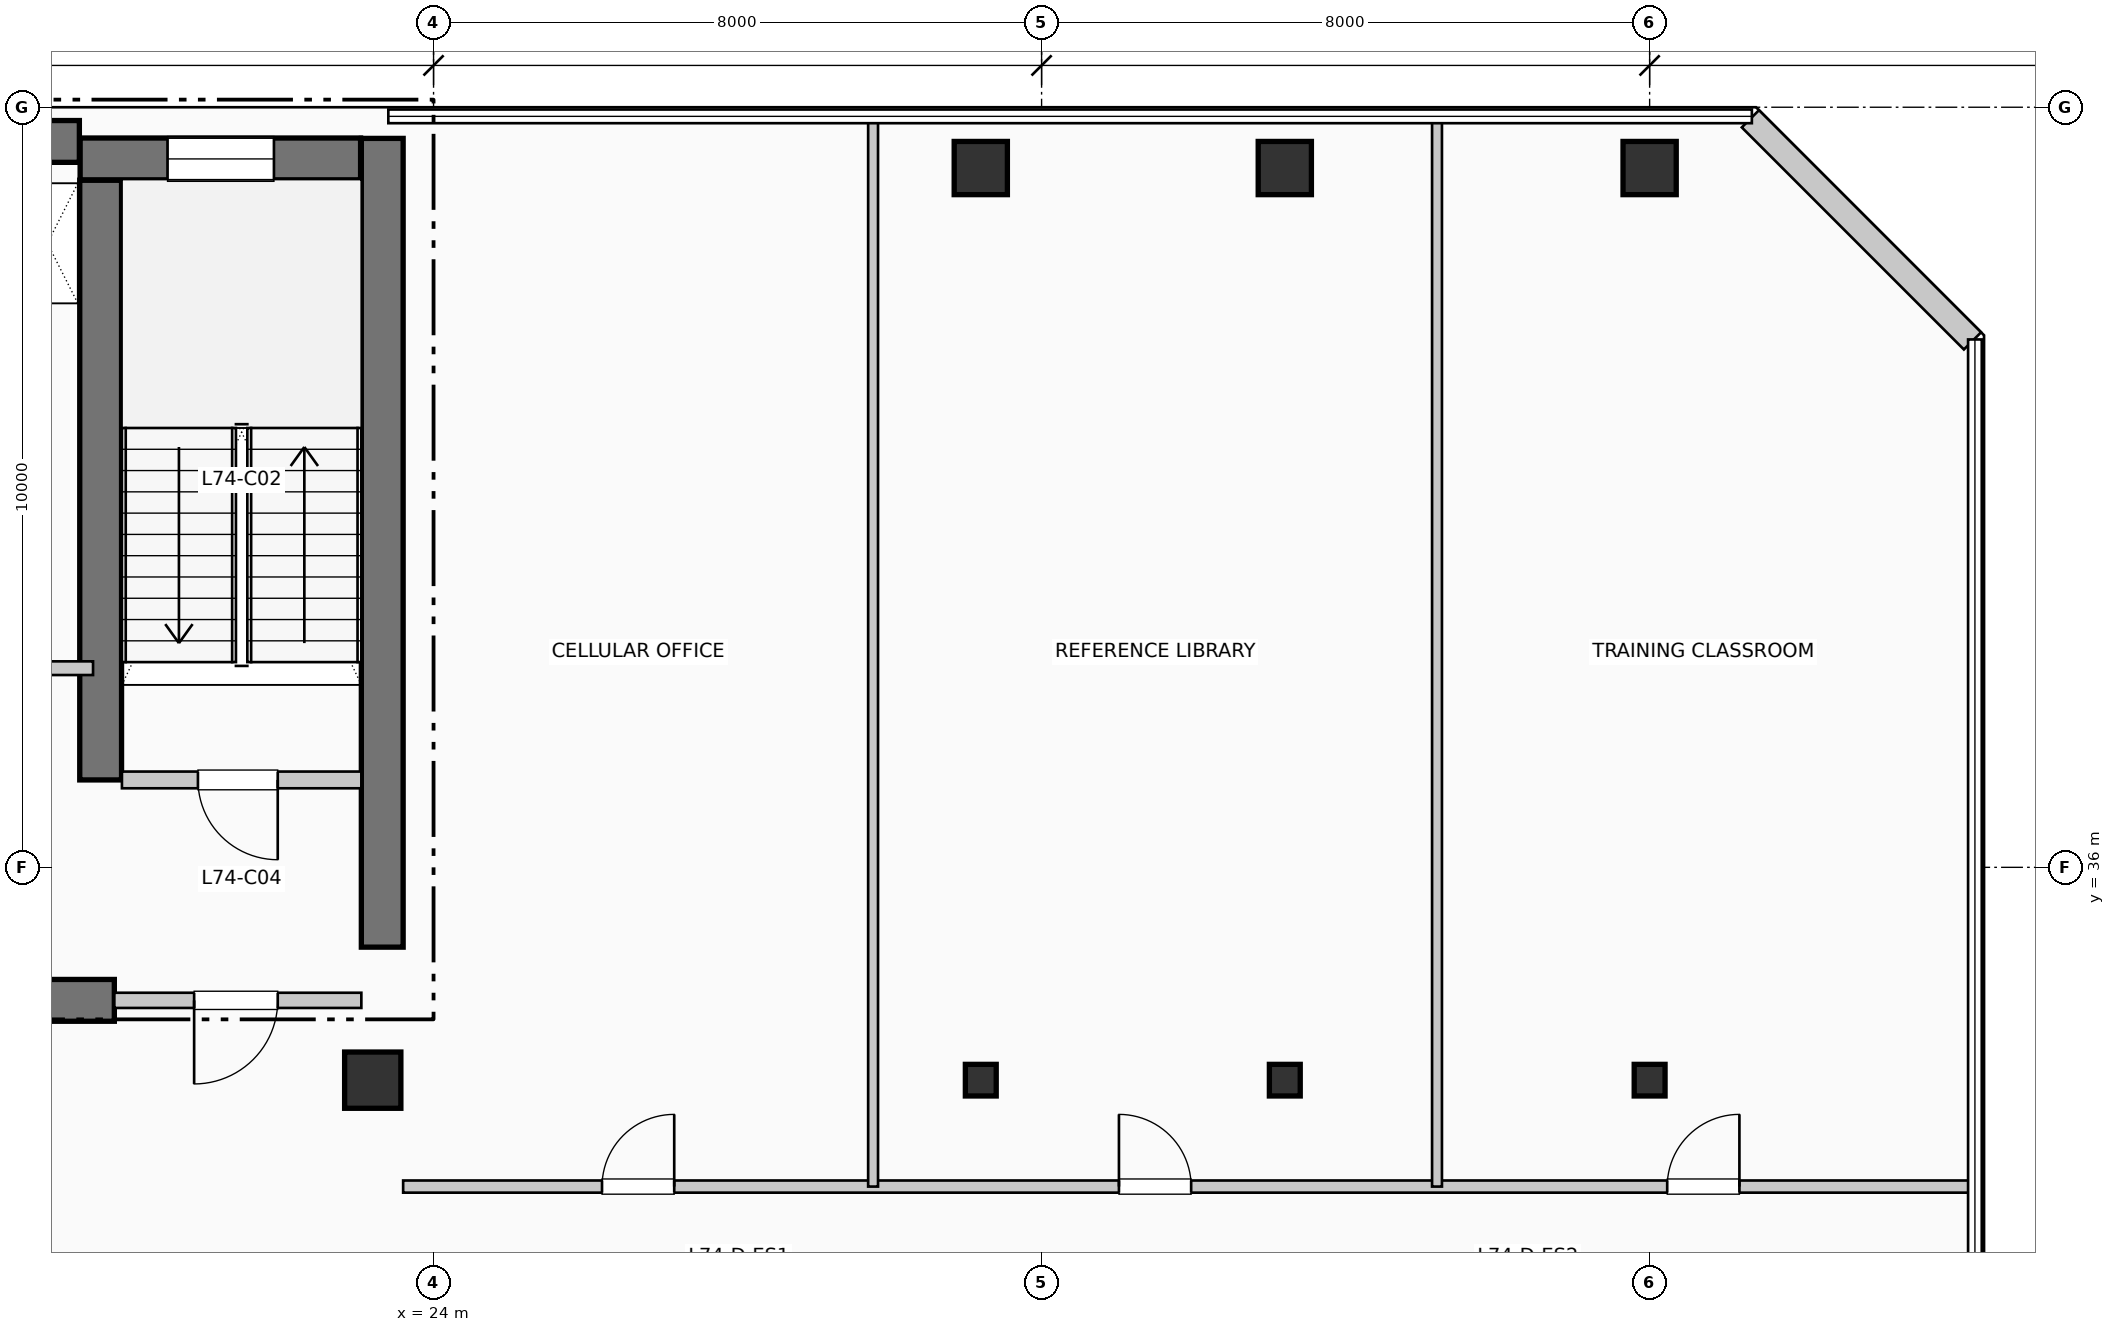
"""IFC4 building model, lengths in metres.
Left out: names, types, materials, properties, quantities, classifications, styles, units other than length and angle.
Written with IfcOpenShell. Run it as: python <this file> out.ifc"""

import sys

from ifc_helpers import new_model, si_unit, direction, frame, frame_2d, origin, origin_2d, place, context, subcontext, project, spatial, rectangle, i_section, extrude, element, fill, save


model = new_model("IFC4")
c1 = context("Model", 3, precision=1e-05, world=origin(), true_north=direction((0.0, 1.0)))
c2 = subcontext(c1, "Body", "Model", "MODEL_VIEW")
j1 = project(units=[si_unit("LENGTHUNIT", "METRE"), si_unit("PLANEANGLEUNIT", "RADIAN")], contexts=[c1])
p1 = place(None, origin())
s1 = spatial("IfcSite", under=j1, at=p1, CompositionType="ELEMENT")
p2 = place(p1, origin())
s2 = spatial("IfcBuilding", under=s1, at=p2, CompositionType="ELEMENT")
p3 = place(p2, frame((0.0, 0.0, 303.93)))
s3 = spatial("IfcBuildingStorey", under=s2, at=p3, CompositionType="ELEMENT", Elevation=303.93)
p4 = place(p3, frame((5.36, 45.55, 0.0), z_axis=(0.0, 0.0, 1.0), x_axis=(1.0, 0.0, 0.0)))
e1 = element("IfcWall", 1, at=p4, inside=s3, PredefinedType="SHEAR", context=c2, shape_type="SweptSolid", body=[
    extrude(rectangle(XDim=13.98, YDim=0.55, at=frame_2d((6.99, 0.0))), origin(), (0.0, 0.0, 1.0), 3.96),
])
p5 = place(p3, frame((23.325, 34.95, 0.0), z_axis=(0.0, 0.0, 1.0), x_axis=(0.0, 1.0, 0.0)))
e2 = element("IfcWall", 2, at=p5, inside=s3, PredefinedType="SHEAR", context=c2, shape_type="SweptSolid", body=[
    extrude(rectangle(XDim=10.64, YDim=0.55, at=frame_2d((5.32, 0.0))), origin(), (0.0, 0.0, 1.0), 3.96),
])
p6 = place(p3, frame((13.68, 34.25, 0.0), z_axis=(0.0, 0.0, 1.0), x_axis=(1.0, 0.0, 0.0)))
e3 = element("IfcWall", 3, at=p6, inside=s3, PredefinedType="SHEAR", context=c2, shape_type="SweptSolid", body=[
    extrude(rectangle(XDim=6.12, YDim=0.55, at=frame_2d((3.06, 0.0))), origin(), (0.0, 0.0, 1.0), 3.96),
])
p7 = place(p3, frame((19.62, 37.15, 0.0), z_axis=(0.0, 0.0, 1.0), x_axis=(0.0, 1.0, 0.0)))
e4 = element("IfcWall", 4, at=p7, inside=s3, PredefinedType="SHEAR", context=c2, shape_type="SweptSolid", body=[
    extrude(rectangle(XDim=7.89, YDim=0.55, at=frame_2d((3.945, 0.0))), origin(), (0.0, 0.0, 1.0), 3.96),
])
p8 = place(p3, frame((19.35, 45.32, 0.0), z_axis=(0.0, 0.0, 1.0), x_axis=(1.0, 0.0, 0.0)))
e5 = element("IfcWall", 5, at=p8, inside=s3, PredefinedType="SHEAR", context=c2, shape_type="SweptSolid", body=[
    extrude(rectangle(XDim=3.69, YDim=0.55, at=frame_2d((1.845, 0.0))), origin(), (0.0, 0.0, 1.0), 3.96),
])
p9 = place(p8, frame((1.15, 0.0, 1.05)))
e6 = element("IfcOpeningElement", 6, at=p9, cuts=e5, PredefinedType="OPENING", context=c2, shape_type="SweptSolid", body=[
    extrude(rectangle(XDim=1.4, YDim=1.8, at=frame_2d((0.7, 0.9))), frame((0.0, 0.285, 0.0), z_axis=(0.0, -1.0, 0.0), x_axis=(1.0, 0.0, 0.0)), (0.0, 0.0, 1.0), 0.57),
])
p10 = place(p3, frame((23.2, 33.2, 0.0), z_axis=(0.0, 0.0, 1.0), x_axis=(1.0, 0.0, 0.0)))
e7 = element("IfcColumn", 7, at=p10, inside=s3, PredefinedType="COLUMN", context=c2, shape_type="SweptSolid", body=[
    extrude(rectangle(XDim=0.74, YDim=0.74, at=origin_2d()), origin(), (0.0, 0.0, 1.0), 3.96),
])
p11 = place(p3, frame((31.2, 33.2, 0.0), z_axis=(0.0, 0.0, 1.0), x_axis=(1.0, 0.0, 0.0)))
e8 = element("IfcColumn", 8, at=p11, inside=s3, PredefinedType="COLUMN", context=c2, shape_type="SweptSolid", body=[
    extrude(i_section(OverallWidth=0.406, OverallDepth=0.416, WebThickness=0.022, FlangeThickness=0.036, at=origin_2d()), origin(), (0.0, 0.0, 1.0), 3.96),
])
p12 = place(p3, frame((31.2, 45.2, 0.0), z_axis=(0.0, 0.0, 1.0), x_axis=(1.0, 0.0, 0.0)))
e9 = element("IfcColumn", 9, at=p12, inside=s3, PredefinedType="COLUMN", context=c2, shape_type="SweptSolid", body=[
    extrude(rectangle(XDim=0.7, YDim=0.7, at=origin_2d()), origin(), (0.0, 0.0, 1.0), 3.96),
])
p13 = place(p3, frame((35.2, 33.2, 0.0), z_axis=(0.0, 0.0, 1.0), x_axis=(1.0, 0.0, 0.0)))
e10 = element("IfcColumn", 10, at=p13, inside=s3, PredefinedType="COLUMN", context=c2, shape_type="SweptSolid", body=[
    extrude(i_section(OverallWidth=0.406, OverallDepth=0.416, WebThickness=0.022, FlangeThickness=0.036, at=origin_2d()), origin(), (0.0, 0.0, 1.0), 3.96),
])
p14 = place(p3, frame((35.2, 45.2, 0.0), z_axis=(0.0, 0.0, 1.0), x_axis=(1.0, 0.0, 0.0)))
e11 = element("IfcColumn", 11, at=p14, inside=s3, PredefinedType="COLUMN", context=c2, shape_type="SweptSolid", body=[
    extrude(rectangle(XDim=0.7, YDim=0.7, at=origin_2d()), origin(), (0.0, 0.0, 1.0), 3.96),
])
p15 = place(p3, frame((40.0, 33.2, 0.0), z_axis=(0.0, 0.0, 1.0), x_axis=(1.0, 0.0, 0.0)))
e12 = element("IfcColumn", 12, at=p15, inside=s3, PredefinedType="COLUMN", context=c2, shape_type="SweptSolid", body=[
    extrude(i_section(OverallWidth=0.406, OverallDepth=0.416, WebThickness=0.022, FlangeThickness=0.036, at=origin_2d()), origin(), (0.0, 0.0, 1.0), 3.96),
])
p16 = place(p3, frame((40.0, 45.2, 0.0), z_axis=(0.0, 0.0, 1.0), x_axis=(1.0, 0.0, 0.0)))
e13 = element("IfcColumn", 13, at=p16, inside=s3, PredefinedType="COLUMN", context=c2, shape_type="SweptSolid", body=[
    extrude(rectangle(XDim=0.7, YDim=0.7, at=origin_2d()), origin(), (0.0, 0.0, 1.0), 3.96),
])
p17 = place(p3, frame((44.248, 42.926, 0.0), z_axis=(0.0, 0.0, 1.0), x_axis=(-0.707136318428, 0.707077242712, 0.0)))
e14 = element("IfcWall", 14, at=p17, inside=s3, PredefinedType="SOLIDWALL", context=c2, shape_type="SweptSolid", body=[
    extrude(rectangle(XDim=4.133, YDim=0.32, at=frame_2d((2.066, 0.0))), origin(), (0.0, 0.0, 1.0), 3.74),
])
p18 = place(p3, frame((19.9, 37.15, 0.0), z_axis=(0.0, 0.0, 1.0), x_axis=(1.0, 0.0, 0.0)))
e15 = element("IfcWall", 15, at=p18, inside=s3, PredefinedType="PARTITIONING", context=c2, shape_type="SweptSolid", body=[
    extrude(rectangle(XDim=3.15, YDim=0.22, at=frame_2d((1.575, 0.0))), origin(), (0.0, 0.0, 1.0), 3.74),
])
p19 = place(p18, frame((2.05, 0.0, 0.0), z_axis=(0.0, 0.0, 1.0), x_axis=(-1.0, 0.0, 0.0)))
e16 = element("IfcOpeningElement", 16, at=p19, cuts=e15, PredefinedType="OPENING", context=c2, shape_type="SweptSolid", body=[
    extrude(rectangle(XDim=1.05, YDim=2.15, at=frame_2d((0.525, 1.075))), frame((0.0, 0.12, 0.0), z_axis=(0.0, -1.0, 0.0), x_axis=(1.0, 0.0, 0.0)), (0.0, 0.0, 1.0), 0.24),
])
p20 = place(p3, frame((19.8, 34.25, 0.0), z_axis=(0.0, 0.0, 1.0), x_axis=(1.0, 0.0, 0.0)))
e17 = element("IfcWall", 17, at=p20, inside=s3, PredefinedType="PARTITIONING", context=c2, shape_type="SweptSolid", body=[
    extrude(rectangle(XDim=3.25, YDim=0.2, at=frame_2d((1.625, 0.0))), origin(), (0.0, 0.0, 1.0), 3.74),
])
p21 = place(p20, frame((2.15, 0.0, 0.0), z_axis=(0.0, 0.0, 1.0), x_axis=(-1.0, 0.0, 0.0)))
e18 = element("IfcOpeningElement", 18, at=p21, cuts=e17, PredefinedType="OPENING", context=c2, shape_type="SweptSolid", body=[
    extrude(rectangle(XDim=1.1, YDim=2.15, at=frame_2d((0.55, 1.075))), frame((0.0, 0.11, 0.0), z_axis=(0.0, -1.0, 0.0), x_axis=(1.0, 0.0, 0.0)), (0.0, 0.0, 1.0), 0.22),
])
p22 = place(p3, frame((17.68, 38.62, 0.0), z_axis=(0.0, 0.0, 1.0), x_axis=(1.0, 0.0, 0.0)))
e19 = element("IfcWall", 19, at=p22, inside=s3, PredefinedType="PARTITIONING", context=c2, shape_type="SweptSolid", body=[
    extrude(rectangle(XDim=1.84, YDim=0.18, at=frame_2d((0.92, 0.0))), origin(), (0.0, 0.0, 1.0), 3.74),
])
p23 = place(p22, frame((0.24, 0.0, 0.0)))
e20 = element("IfcOpeningElement", 20, at=p23, cuts=e19, PredefinedType="OPENING", context=c2, shape_type="SweptSolid", body=[
    extrude(rectangle(XDim=0.92, YDim=2.1, at=frame_2d((0.46, 1.05))), frame((0.0, 0.1, 0.0), z_axis=(0.0, -1.0, 0.0), x_axis=(1.0, 0.0, 0.0)), (0.0, 0.0, 1.0), 0.2),
])
p24 = place(p3, frame((23.6, 31.8, 0.0), z_axis=(0.0, 0.0, 1.0), x_axis=(1.0, 0.0, 0.0)))
e21 = element("IfcWall", 21, at=p24, inside=s3, PredefinedType="PARTITIONING", context=c2, shape_type="SweptSolid", body=[
    extrude(rectangle(XDim=20.61, YDim=0.16, at=frame_2d((10.305, 0.0))), origin(), (0.0, 0.0, 1.0), 3.74),
])
p25 = place(p24, frame((2.616, 0.0, 0.0)))
e22 = element("IfcOpeningElement", 22, at=p25, cuts=e21, PredefinedType="OPENING", context=c2, shape_type="SweptSolid", body=[
    extrude(rectangle(XDim=0.95, YDim=2.15, at=frame_2d((0.475, 1.075))), frame((0.0, 0.09, 0.0), z_axis=(0.0, -1.0, 0.0), x_axis=(1.0, 0.0, 0.0)), (0.0, 0.0, 1.0), 0.18),
])
p26 = place(p24, frame((9.418, 0.0, 0.0)))
e23 = element("IfcOpeningElement", 23, at=p26, cuts=e21, PredefinedType="OPENING", context=c2, shape_type="SweptSolid", body=[
    extrude(rectangle(XDim=0.95, YDim=2.15, at=frame_2d((0.475, 1.075))), frame((0.0, 0.09, 0.0), z_axis=(0.0, -1.0, 0.0), x_axis=(1.0, 0.0, 0.0)), (0.0, 0.0, 1.0), 0.18),
])
p27 = place(p24, frame((16.631, 0.0, 0.0)))
e24 = element("IfcOpeningElement", 24, at=p27, cuts=e21, PredefinedType="OPENING", context=c2, shape_type="SweptSolid", body=[
    extrude(rectangle(XDim=0.95, YDim=2.15, at=frame_2d((0.475, 1.075))), frame((0.0, 0.09, 0.0), z_axis=(0.0, -1.0, 0.0), x_axis=(1.0, 0.0, 0.0)), (0.0, 0.0, 1.0), 0.18),
])
for number, where, z_axis, x_axis in (
    (25, (29.783, 31.8, 0.0), (0.0, 0.0, 1.0), (0.0, 1.0, 0.0)),
    (26, (37.203, 31.8, 0.0), (0.0, 0.0, 1.0), (0.0, 1.0, 0.0)),
):
    element("IfcWall", number, at=place(p3, frame(where, z_axis=z_axis, x_axis=x_axis)), inside=s3, PredefinedType="PARTITIONING", context=c2, shape_type="SweptSolid", body=[
        extrude(rectangle(XDim=14.01, YDim=0.13, at=frame_2d((7.005, 0.0))), origin(), (0.0, 0.0, 1.0), 3.74),
    ])
p28 = place(p9, origin())
e27 = element("IfcWindow", 27, at=p28, inside=s3, PartitioningType="SINGLE_PANEL", PredefinedType="WINDOW", context=c2, shape_type="SweptSolid", body=[
    extrude(rectangle(XDim=1.4, YDim=1.8, at=frame_2d((0.7, 0.9))), frame((0.0, 0.03, 0.0), z_axis=(0.0, -1.0, 0.0), x_axis=(1.0, 0.0, 0.0)), (0.0, 0.0, 1.0), 0.06),
])
fill(e6, e27)
p29 = place(p19, origin())
e28 = element("IfcDoor", 28, at=p29, inside=s3, OperationType="SINGLE_SWING_RIGHT", PredefinedType="DOOR", context=c2, shape_type="SweptSolid", body=[
    extrude(rectangle(XDim=1.05, YDim=2.15, at=frame_2d((0.525, 1.075))), frame((0.0, 0.025, 0.0), z_axis=(0.0, -1.0, 0.0), x_axis=(1.0, 0.0, 0.0)), (0.0, 0.0, 1.0), 0.05),
])
fill(e16, e28)
p30 = place(p21, origin())
e29 = element("IfcDoor", 29, at=p30, inside=s3, OperationType="SINGLE_SWING_LEFT", PredefinedType="DOOR", context=c2, shape_type="SweptSolid", body=[
    extrude(rectangle(XDim=1.1, YDim=2.15, at=frame_2d((0.55, 1.075))), frame((0.0, 0.025, 0.0), z_axis=(0.0, -1.0, 0.0), x_axis=(1.0, 0.0, 0.0)), (0.0, 0.0, 1.0), 0.05),
])
fill(e18, e29)
p31 = place(p25, origin())
e30 = element("IfcDoor", 30, at=p31, inside=s3, OperationType="SINGLE_SWING_RIGHT", PredefinedType="DOOR", context=c2, shape_type="SweptSolid", body=[
    extrude(rectangle(XDim=0.95, YDim=2.15, at=frame_2d((0.475, 1.075))), frame((0.0, 0.025, 0.0), z_axis=(0.0, -1.0, 0.0), x_axis=(1.0, 0.0, 0.0)), (0.0, 0.0, 1.0), 0.05),
])
fill(e22, e30)
p32 = place(p26, origin())
e31 = element("IfcDoor", 31, at=p32, inside=s3, OperationType="SINGLE_SWING_LEFT", PredefinedType="DOOR", context=c2, shape_type="SweptSolid", body=[
    extrude(rectangle(XDim=0.95, YDim=2.15, at=frame_2d((0.475, 1.075))), frame((0.0, 0.025, 0.0), z_axis=(0.0, -1.0, 0.0), x_axis=(1.0, 0.0, 0.0)), (0.0, 0.0, 1.0), 0.05),
])
fill(e23, e31)
p33 = place(p27, origin())
e32 = element("IfcDoor", 32, at=p33, inside=s3, OperationType="SINGLE_SWING_RIGHT", PredefinedType="DOOR", context=c2, shape_type="SweptSolid", body=[
    extrude(rectangle(XDim=0.95, YDim=2.15, at=frame_2d((0.475, 1.075))), frame((0.0, 0.025, 0.0), z_axis=(0.0, -1.0, 0.0), x_axis=(1.0, 0.0, 0.0)), (0.0, 0.0, 1.0), 0.05),
])
fill(e24, e32)
save(model, sys.argv[1])
